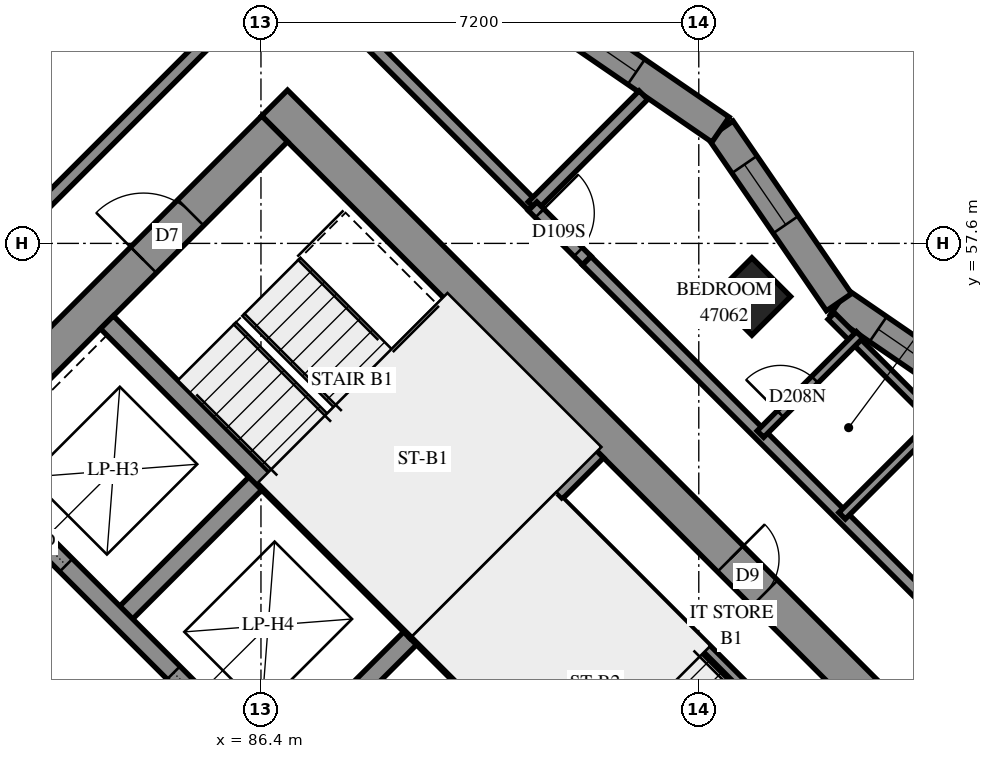
"""IFC4 building model, lengths in metres.
Left out: names, types, materials, properties, quantities, classifications, styles, units other than length and angle.
Written with IfcOpenShell. Run it as: python <this file> out.ifc"""

import sys

from ifc_helpers import new_model, si_unit, direction, frame, frame_2d, origin, origin_2d, place, context, subcontext, project, spatial, polyline, rectangle, outline, extrude, element, fill, save


model = new_model("IFC4")
c1 = context("Model", 3, precision=1e-05, world=origin(), true_north=direction((0.0, 1.0)))
c2 = subcontext(c1, "Body", "Model", "MODEL_VIEW")
j1 = project(units=[si_unit("LENGTHUNIT", "METRE"), si_unit("PLANEANGLEUNIT", "RADIAN")], contexts=[c1])
p1 = place(None, origin())
s1 = spatial("IfcSite", under=j1, at=p1, CompositionType="ELEMENT")
p2 = place(p1, origin())
s2 = spatial("IfcBuilding", under=s1, at=p2, CompositionType="ELEMENT")
p3 = place(p2, frame((0.0, 0.0, 172.8)))
s3 = spatial("IfcBuildingStorey", under=s2, at=p3, CompositionType="ELEMENT", Elevation=172.8)
p4 = place(p3, frame((94.474, 56.727, 0.0), z_axis=(0.0, 0.0, 1.0), x_axis=(0.7071067812, -0.7071067812, 0.0)))
e1 = element("IfcColumn", 1, at=p4, inside=s3, PredefinedType="COLUMN", context=c2, shape_type="SweptSolid", body=[
    extrude(rectangle(XDim=0.9, YDim=0.9, at=origin_2d()), origin(), (0.0, 0.0, 1.0), 3.1),
])
p5 = place(p3, frame((86.625, 59.908, -0.3), z_axis=(0.0, 0.0, 1.0), x_axis=(0.7071067812, -0.7071067812, 0.0)))
e2 = element("IfcWall", 2, at=p5, inside=s3, PredefinedType="SHEAR", context=c2, shape_type="SweptSolid", body=[
    extrude(rectangle(XDim=15.6, YDim=0.6, at=frame_2d((7.8, 0.0))), origin(), (0.0, 0.0, 1.0), 2.7),
])
p6 = place(p5, frame((10.6, 0.0, 0.3)))
e3 = element("IfcOpeningElement", 3, at=p6, cuts=e2, PredefinedType="OPENING", context=c2, shape_type="SweptSolid", body=[
    extrude(rectangle(XDim=0.8, YDim=2.1, at=frame_2d((0.4, 1.05))), frame((0.0, 0.31, 0.0), z_axis=(0.0, -1.0, 0.0), x_axis=(1.0, 0.0, 0.0)), (0.0, 0.0, 1.0), 0.62),
])
p7 = place(p3, frame((76.442, 49.302, -0.3), z_axis=(0.0, 0.0, 1.0), x_axis=(0.7071067812, 0.7071067812, 0.0)))
e4 = element("IfcWall", 4, at=p7, inside=s3, PredefinedType="SHEAR", context=c2, shape_type="SweptSolid", body=[
    extrude(rectangle(XDim=14.4, YDim=0.6, at=frame_2d((7.2, 0.0))), origin(), (0.0, 0.0, 1.0), 2.7),
])
p8 = place(p7, frame((4.55, 0.0, 0.3)))
e5 = element("IfcOpeningElement", 5, at=p8, cuts=e4, PredefinedType="OPENING", context=c2, shape_type="SweptSolid", body=[
    extrude(rectangle(XDim=1.1, YDim=2.1, at=frame_2d((0.55, 1.05))), frame((0.0, 0.31, 0.0), z_axis=(0.0, -1.0, 0.0), x_axis=(1.0, 0.0, 0.0)), (0.0, 0.0, 1.0), 0.62),
])
p9 = place(p7, frame((11.35, 0.0, 0.3)))
e6 = element("IfcOpeningElement", 6, at=p9, cuts=e4, PredefinedType="OPENING", context=c2, shape_type="SweptSolid", body=[
    extrude(rectangle(XDim=1.1, YDim=2.1, at=frame_2d((0.55, 1.05))), frame((0.0, 0.31, 0.0), z_axis=(0.0, -1.0, 0.0), x_axis=(1.0, 0.0, 0.0)), (0.0, 0.0, 1.0), 0.62),
])
p10 = place(p3, frame((84.079, 51.423, 0.0), z_axis=(0.0, 0.0, 1.0), x_axis=(0.7071219326, 0.7070916295, 0.0)))
e7 = element("IfcWall", 7, at=p10, inside=s3, PredefinedType="SOLIDWALL", context=c2, shape_type="SweptSolid", body=[
    extrude(rectangle(XDim=3.3, YDim=0.3, at=frame_2d((1.65, 0.0))), origin(), (0.0, 0.0, 1.0), 3.1),
])
p11 = place(p3, frame((86.625, 48.878, 0.0), z_axis=(0.0, 0.0, 1.0), x_axis=(0.7071067812, 0.7071067812, 0.0)))
e8 = element("IfcWall", 8, at=p11, inside=s3, PredefinedType="SOLIDWALL", context=c2, shape_type="SweptSolid", body=[
    extrude(rectangle(XDim=3.3, YDim=0.3, at=frame_2d((1.65, 0.0))), origin(), (0.0, 0.0, 1.0), 3.1),
])
p12 = place(p3, frame((78.988, 51.423, 0.0), z_axis=(0.0, 0.0, 1.0), x_axis=(0.7071067812, -0.7071067812, 0.0)))
e9 = element("IfcWall", 9, at=p12, inside=s3, PredefinedType="SOLIDWALL", context=c2, shape_type="SweptSolid", body=[
    extrude(rectangle(XDim=14.4, YDim=0.3, at=frame_2d((7.2, 0.0))), origin(), (0.0, 0.0, 1.0), 3.1),
])
p13 = place(p12, frame((1.35, 0.0, 0.0)))
e10 = element("IfcOpeningElement", 10, at=p13, cuts=e9, PredefinedType="OPENING", context=c2, shape_type="SweptSolid", body=[
    extrude(rectangle(XDim=0.9, YDim=2.1, at=frame_2d((0.45, 1.05))), frame((0.0, 0.16, 0.0), z_axis=(0.0, -1.0, 0.0), x_axis=(1.0, 0.0, 0.0)), (0.0, 0.0, 1.0), 0.32),
])
p14 = place(p12, frame((4.95, 0.0, 0.0)))
e11 = element("IfcOpeningElement", 11, at=p14, cuts=e9, PredefinedType="OPENING", context=c2, shape_type="SweptSolid", body=[
    extrude(rectangle(XDim=0.9, YDim=2.1, at=frame_2d((0.45, 1.05))), frame((0.0, 0.16, 0.0), z_axis=(0.0, -1.0, 0.0), x_axis=(1.0, 0.0, 0.0)), (0.0, 0.0, 1.0), 0.32),
])
p15 = place(p12, frame((8.55, 0.0, 0.0)))
e12 = element("IfcOpeningElement", 12, at=p15, cuts=e9, PredefinedType="OPENING", context=c2, shape_type="SweptSolid", body=[
    extrude(rectangle(XDim=0.9, YDim=2.1, at=frame_2d((0.45, 1.05))), frame((0.0, 0.16, 0.0), z_axis=(0.0, -1.0, 0.0), x_axis=(1.0, 0.0, 0.0)), (0.0, 0.0, 1.0), 0.32),
])
p16 = place(p12, frame((12.05, 0.0, 0.0)))
e13 = element("IfcOpeningElement", 13, at=p16, cuts=e9, PredefinedType="OPENING", context=c2, shape_type="SweptSolid", body=[
    extrude(rectangle(XDim=1.1, YDim=2.1, at=frame_2d((0.55, 1.05))), frame((0.0, 0.16, 0.0), z_axis=(0.0, -1.0, 0.0), x_axis=(1.0, 0.0, 0.0)), (0.0, 0.0, 1.0), 0.32),
])
p17 = place(p3, frame((81.534, 53.969, 0.0), z_axis=(0.0, 0.0, 1.0), x_axis=(0.707103309, -0.7071102534, 0.0)))
e14 = element("IfcWall", 14, at=p17, inside=s3, PredefinedType="SOLIDWALL", context=c2, shape_type="SweptSolid", body=[
    extrude(rectangle(XDim=14.4, YDim=0.3, at=frame_2d((7.2, 0.0))), origin(), (0.0, 0.0, 1.0), 3.1),
])
p18 = place(p17, frame((1.25, 0.0, 0.0)))
e15 = element("IfcOpeningElement", 15, at=p18, cuts=e14, PredefinedType="OPENING", context=c2, shape_type="SweptSolid", body=[
    extrude(rectangle(XDim=1.1, YDim=2.1, at=frame_2d((0.55, 1.05))), frame((0.0, 0.16, 0.0), z_axis=(0.0, -1.0, 0.0), x_axis=(1.0, 0.0, 0.0)), (0.0, 0.0, 1.0), 0.32),
])
p19 = place(p17, frame((4.85, 0.0, 0.0)))
e16 = element("IfcOpeningElement", 16, at=p19, cuts=e14, PredefinedType="OPENING", context=c2, shape_type="SweptSolid", body=[
    extrude(rectangle(XDim=1.1, YDim=2.1, at=frame_2d((0.55, 1.05))), frame((0.0, 0.16, 0.0), z_axis=(0.0, -1.0, 0.0), x_axis=(1.0, 0.0, 0.0)), (0.0, 0.0, 1.0), 0.32),
])
p20 = place(p17, frame((8.45, 0.0, 0.0)))
e17 = element("IfcOpeningElement", 17, at=p20, cuts=e14, PredefinedType="OPENING", context=c2, shape_type="SweptSolid", body=[
    extrude(rectangle(XDim=1.1, YDim=2.1, at=frame_2d((0.55, 1.05))), frame((0.0, 0.16, 0.0), z_axis=(0.0, -1.0, 0.0), x_axis=(1.0, 0.0, 0.0)), (0.0, 0.0, 1.0), 0.32),
])
p21 = place(p17, frame((12.05, 0.0, 0.0)))
e18 = element("IfcOpeningElement", 18, at=p21, cuts=e14, PredefinedType="OPENING", context=c2, shape_type="SweptSolid", body=[
    extrude(rectangle(XDim=1.1, YDim=2.1, at=frame_2d((0.55, 1.05))), frame((0.0, 0.16, 0.0), z_axis=(0.0, -1.0, 0.0), x_axis=(1.0, 0.0, 0.0)), (0.0, 0.0, 1.0), 0.32),
])
for number, where, z_axis, x_axis in (
    (19, (83.867, 56.302, 0.0), (0.0, 0.0, 1.0), (0.707, -0.707, 0.0)),
    (20, (88.958, 51.211, 0.0), (0.0, 0.0, 1.0), (0.707, -0.707, 0.0)),
):
    element("IfcWall", number, at=place(p3, frame(where, z_axis=z_axis, x_axis=x_axis)), inside=s3, PredefinedType="SOLIDWALL", context=c2, shape_type="SweptSolid", body=[
        extrude(rectangle(XDim=7.2, YDim=0.3, at=frame_2d((3.6, 0.0))), origin(), (0.0, 0.0, 1.0), 3.1),
    ])
p22 = place(p3, frame((88.958, 51.211, 0.0), z_axis=(0.0, 0.0, 1.0), x_axis=(0.7071067812, 0.7071067812, 0.0)))
e21 = element("IfcWall", 21, at=p22, inside=s3, PredefinedType="SOLIDWALL", context=c2, shape_type="SweptSolid", body=[
    extrude(rectangle(XDim=4.2, YDim=0.3, at=frame_2d((2.1, 0.0))), origin(), (0.0, 0.0, 1.0), 3.1),
])
p23 = place(p3, frame((98.744, 54.685, 0.0), z_axis=(0.0, 0.0, 1.0), x_axis=(-0.8245797835, 0.5657456855, 0.0)))
e22 = element("IfcWall", 22, at=p23, inside=s3, PredefinedType="SOLIDWALL", context=c2, shape_type="SweptSolid", body=[
    extrude(outline(polyline([(-0.046, -0.25), (3.396, -0.25), (3.489, 0.25), (0.046, 0.25), (-0.046, -0.25)])), origin(), (0.0, 0.0, 1.0), 3.1),
])
p24 = place(p23, frame((1.46, 0.0, 0.45)))
e23 = element("IfcOpeningElement", 23, at=p24, cuts=e22, PredefinedType="OPENING", context=c2, shape_type="SweptSolid", body=[
    extrude(rectangle(XDim=1.2, YDim=2.5, at=frame_2d((0.6, 1.25))), frame((0.0, 0.26, 0.0), z_axis=(0.0, -1.0, 0.0), x_axis=(1.0, 0.0, 0.0)), (0.0, 0.0, 1.0), 0.52),
])
p25 = place(p3, frame((95.905, 56.632, 0.0), z_axis=(0.0, 0.0, 1.0), x_axis=(-0.5657456855, 0.8245797835, 0.0)))
e24 = element("IfcWall", 24, at=p25, inside=s3, PredefinedType="SOLIDWALL", context=c2, shape_type="SweptSolid", body=[
    extrude(outline(polyline([(0.046, -0.25), (3.489, -0.25), (3.396, 0.25), (-0.046, 0.25), (0.046, -0.25)])), origin(), (0.0, 0.0, 1.0), 3.1),
])
p26 = place(p25, frame((1.547, 0.0, 0.45)))
e25 = element("IfcOpeningElement", 25, at=p26, cuts=e24, PredefinedType="OPENING", context=c2, shape_type="SweptSolid", body=[
    extrude(rectangle(XDim=1.2, YDim=2.5, at=frame_2d((0.6, 1.25))), frame((0.0, 0.26, 0.0), z_axis=(0.0, -1.0, 0.0), x_axis=(1.0, 0.0, 0.0)), (0.0, 0.0, 1.0), 0.52),
])
p27 = place(p3, frame((93.958, 59.471, 0.0), z_axis=(0.0, 0.0, 1.0), x_axis=(-0.8245662316, 0.5657654369, 0.0)))
e26 = element("IfcWall", 26, at=p27, inside=s3, PredefinedType="SOLIDWALL", context=c2, shape_type="SweptSolid", body=[
    extrude(outline(polyline([(-0.046, -0.25), (3.396, -0.25), (3.489, 0.25), (0.046, 0.25), (-0.046, -0.25)])), origin(), (0.0, 0.0, 1.0), 3.1),
])
p28 = place(p27, frame((1.68, 0.0, 0.45)))
e27 = element("IfcOpeningElement", 27, at=p28, cuts=e26, PredefinedType="OPENING", context=c2, shape_type="SweptSolid", body=[
    extrude(rectangle(XDim=1.2, YDim=2.5, at=frame_2d((0.6, 1.25))), frame((0.0, 0.26, 0.0), z_axis=(0.0, -1.0, 0.0), x_axis=(1.0, 0.0, 0.0)), (0.0, 0.0, 1.0), 0.52),
])
p29 = place(p3, frame((91.313, 53.354, 0.0), z_axis=(0.0, 0.0, 1.0), x_axis=(0.7071140275, -0.7070995348, 0.0)))
e28 = element("IfcWall", 28, at=p29, inside=s3, PredefinedType="PARTITIONING", context=c2, shape_type="SweptSolid", body=[
    extrude(rectangle(XDim=6.9, YDim=0.15, at=frame_2d((3.45, 0.0))), origin(), (0.0, 0.0, 1.0), 3.1),
])
p30 = place(p3, frame((91.755, 57.317, 0.0), z_axis=(0.0, 0.0, 1.0), x_axis=(0.7071067812, -0.7071067812, 0.0)))
e29 = element("IfcWall", 29, at=p30, inside=s3, PredefinedType="PARTITIONING", context=c2, shape_type="SweptSolid", body=[
    extrude(rectangle(XDim=11.639, YDim=0.2, at=frame_2d((5.819, 0.0))), origin(), (0.0, 0.0, 1.0), 3.1),
])
p31 = place(p3, frame((80.154, 55.56, 0.0), z_axis=(0.0, 0.0, 1.0), x_axis=(0.7071067812, 0.7071067812, 0.0)))
e30 = element("IfcWall", 30, at=p31, inside=s3, PredefinedType="PARTITIONING", context=c2, shape_type="SweptSolid", body=[
    extrude(rectangle(XDim=9.45, YDim=0.2, at=frame_2d((4.725, 0.0))), origin(), (0.0, 0.0, 1.0), 3.1),
])
p32 = place(p31, frame((0.292, 0.0, 0.0)))
e31 = element("IfcOpeningElement", 31, at=p32, cuts=e30, PredefinedType="OPENING", context=c2, shape_type="SweptSolid", body=[
    extrude(rectangle(XDim=1.0, YDim=2.1, at=frame_2d((0.5, 1.05))), frame((0.0, 0.11, 0.0), z_axis=(0.0, -1.0, 0.0), x_axis=(1.0, 0.0, 0.0)), (0.0, 0.0, 1.0), 0.22),
])
p33 = place(p3, frame((86.841, 62.245, 0.0), z_axis=(0.0, 0.0, 1.0), x_axis=(0.7071067812, -0.7071067812, 0.0)))
e32 = element("IfcWall", 32, at=p33, inside=s3, PredefinedType="PARTITIONING", context=c2, shape_type="SweptSolid", body=[
    extrude(rectangle(XDim=5.699, YDim=0.2, at=frame_2d((2.85, 0.0))), origin(), (0.0, 0.0, 1.0), 3.1),
])
p34 = place(p3, frame((95.957, 53.121, 0.0), z_axis=(0.0, 0.0, 1.0), x_axis=(0.7070879914, 0.7071255705, 0.0)))
e33 = element("IfcWall", 33, at=p34, inside=s3, PredefinedType="PARTITIONING", context=c2, shape_type="SweptSolid", body=[
    extrude(rectangle(XDim=2.661, YDim=0.15, at=frame_2d((1.331, 0.0))), origin(), (0.0, 0.0, 1.0), 3.1),
])
p35 = place(p3, frame((90.867, 58.213, 0.0), z_axis=(0.0, 0.0, 1.0), x_axis=(0.7066219104, 0.7075913198, 0.0)))
e34 = element("IfcWall", 34, at=p35, inside=s3, PredefinedType="PARTITIONING", context=c2, shape_type="SweptSolid", body=[
    extrude(rectangle(XDim=2.579, YDim=0.2, at=frame_2d((1.289, 0.0))), origin(), (0.0, 0.0, 1.0), 3.1),
])
p36 = place(p3, frame((95.779, 56.405, 0.0), z_axis=(0.0, 0.0, 1.0), x_axis=(0.7071067812, -0.7071067812, 0.0)))
e35 = element("IfcWall", 35, at=p36, inside=s3, PredefinedType="PARTITIONING", context=c2, shape_type="SweptSolid", body=[
    extrude(rectangle(XDim=2.449, YDim=0.15, at=frame_2d((1.225, 0.0))), origin(), (0.0, 0.0, 1.0), 3.1),
])
p37 = place(p3, frame((94.614, 54.464, 0.0), z_axis=(0.0, 0.0, 1.0), x_axis=(0.7070851111, 0.7071284506, 0.0)))
e36 = element("IfcWall", 36, at=p37, inside=s3, PredefinedType="PARTITIONING", context=c2, shape_type="SweptSolid", body=[
    extrude(rectangle(XDim=2.307, YDim=0.15, at=frame_2d((1.154, 0.0))), origin(), (0.0, 0.0, 1.0), 3.1),
])
p38 = place(p37, frame((0.466, 0.0, 0.0)))
e37 = element("IfcOpeningElement", 37, at=p38, cuts=e36, PredefinedType="OPENING", context=c2, shape_type="SweptSolid", body=[
    extrude(rectangle(XDim=0.8, YDim=2.1, at=frame_2d((0.4, 1.05))), frame((0.0, 0.085, 0.0), z_axis=(0.0, -1.0, 0.0), x_axis=(1.0, 0.0, 0.0)), (0.0, 0.0, 1.0), 0.17),
])
p39 = place(p3, frame((90.867, 58.211, 0.0), z_axis=(0.0, 0.0, 1.0), x_axis=(0.706312726, -0.7078999456, 0.0)))
e38 = element("IfcWall", 38, at=p39, inside=s3, PredefinedType="PARTITIONING", context=c2, shape_type="SweptSolid", body=[
    extrude(rectangle(XDim=1.26, YDim=0.2, at=frame_2d((0.63, 0.0))), origin(), (0.0, 0.0, 1.0), 3.1),
])
p40 = place(p39, frame((0.162, 0.0, 0.0)))
e39 = element("IfcOpeningElement", 39, at=p40, cuts=e38, PredefinedType="OPENING", context=c2, shape_type="SweptSolid", body=[
    extrude(rectangle(XDim=0.9, YDim=2.1, at=frame_2d((0.45, 1.05))), frame((0.0, 0.11, 0.0), z_axis=(0.0, -1.0, 0.0), x_axis=(1.0, 0.0, 0.0)), (0.0, 0.0, 1.0), 0.22),
])
p41 = place(p24, origin())
e40 = element("IfcWindow", 40, at=p41, inside=s3, PartitioningType="SINGLE_PANEL", PredefinedType="WINDOW", context=c2, shape_type="SweptSolid", body=[
    extrude(rectangle(XDim=1.2, YDim=2.5, at=frame_2d((0.6, 1.25))), frame((0.0, 0.18, 0.0), z_axis=(0.0, -1.0, 0.0), x_axis=(1.0, 0.0, 0.0)), (0.0, 0.0, 1.0), 0.06),
])
fill(e23, e40)
p42 = place(p26, origin())
e41 = element("IfcWindow", 41, at=p42, inside=s3, PartitioningType="SINGLE_PANEL", PredefinedType="WINDOW", context=c2, shape_type="SweptSolid", body=[
    extrude(rectangle(XDim=1.2, YDim=2.5, at=frame_2d((0.6, 1.25))), frame((0.0, 0.18, 0.0), z_axis=(0.0, -1.0, 0.0), x_axis=(1.0, 0.0, 0.0)), (0.0, 0.0, 1.0), 0.06),
])
fill(e25, e41)
p43 = place(p28, origin())
e42 = element("IfcWindow", 42, at=p43, inside=s3, PartitioningType="SINGLE_PANEL", PredefinedType="WINDOW", context=c2, shape_type="SweptSolid", body=[
    extrude(rectangle(XDim=1.2, YDim=2.5, at=frame_2d((0.6, 1.25))), frame((0.0, 0.18, 0.0), z_axis=(0.0, -1.0, 0.0), x_axis=(1.0, 0.0, 0.0)), (0.0, 0.0, 1.0), 0.06),
])
fill(e27, e42)
p44 = place(p6, origin())
e43 = element("IfcDoor", 43, at=p44, inside=s3, OperationType="SINGLE_SWING_RIGHT", PredefinedType="DOOR", context=c2, shape_type="SweptSolid", body=[
    extrude(rectangle(XDim=0.8, YDim=2.1, at=frame_2d((0.4, 1.05))), frame((0.0, 0.025, 0.0), z_axis=(0.0, -1.0, 0.0), x_axis=(1.0, 0.0, 0.0)), (0.0, 0.0, 1.0), 0.05),
])
fill(e3, e43)
p45 = place(p9, origin())
e44 = element("IfcDoor", 44, at=p45, inside=s3, OperationType="SINGLE_SWING_LEFT", PredefinedType="DOOR", context=c2, shape_type="SweptSolid", body=[
    extrude(rectangle(XDim=1.1, YDim=2.1, at=frame_2d((0.55, 1.05))), frame((0.0, 0.025, 0.0), z_axis=(0.0, -1.0, 0.0), x_axis=(1.0, 0.0, 0.0)), (0.0, 0.0, 1.0), 0.05),
])
fill(e6, e44)
p46 = place(p18, origin())
e45 = element("IfcDoor", 45, at=p46, inside=s3, OperationType="SLIDING_TO_LEFT", PredefinedType="DOOR", context=c2, shape_type="SweptSolid", body=[
    extrude(rectangle(XDim=1.1, YDim=2.1, at=frame_2d((0.55, 1.05))), frame((0.0, 0.025, 0.0), z_axis=(0.0, -1.0, 0.0), x_axis=(1.0, 0.0, 0.0)), (0.0, 0.0, 1.0), 0.05),
])
fill(e15, e45)
p47 = place(p19, origin())
e46 = element("IfcDoor", 46, at=p47, inside=s3, OperationType="SLIDING_TO_RIGHT", PredefinedType="DOOR", context=c2, shape_type="SweptSolid", body=[
    extrude(rectangle(XDim=1.1, YDim=2.1, at=frame_2d((0.55, 1.05))), frame((0.0, 0.025, 0.0), z_axis=(0.0, -1.0, 0.0), x_axis=(1.0, 0.0, 0.0)), (0.0, 0.0, 1.0), 0.05),
])
fill(e16, e46)
p48 = place(p40, origin())
e47 = element("IfcDoor", 47, at=p48, inside=s3, OperationType="SINGLE_SWING_RIGHT", PredefinedType="DOOR", context=c2, shape_type="SweptSolid", body=[
    extrude(rectangle(XDim=0.9, YDim=2.1, at=frame_2d((0.45, 1.05))), frame((0.0, 0.025, 0.0), z_axis=(0.0, -1.0, 0.0), x_axis=(1.0, 0.0, 0.0)), (0.0, 0.0, 1.0), 0.05),
])
fill(e39, e47)
p49 = place(p38, origin())
e48 = element("IfcDoor", 48, at=p49, inside=s3, OperationType="SINGLE_SWING_RIGHT", PredefinedType="DOOR", context=c2, shape_type="SweptSolid", body=[
    extrude(rectangle(XDim=0.8, YDim=2.1, at=frame_2d((0.4, 1.05))), frame((0.0, 0.025, 0.0), z_axis=(0.0, -1.0, 0.0), x_axis=(1.0, 0.0, 0.0)), (0.0, 0.0, 1.0), 0.05),
])
fill(e37, e48)
save(model, sys.argv[1])
